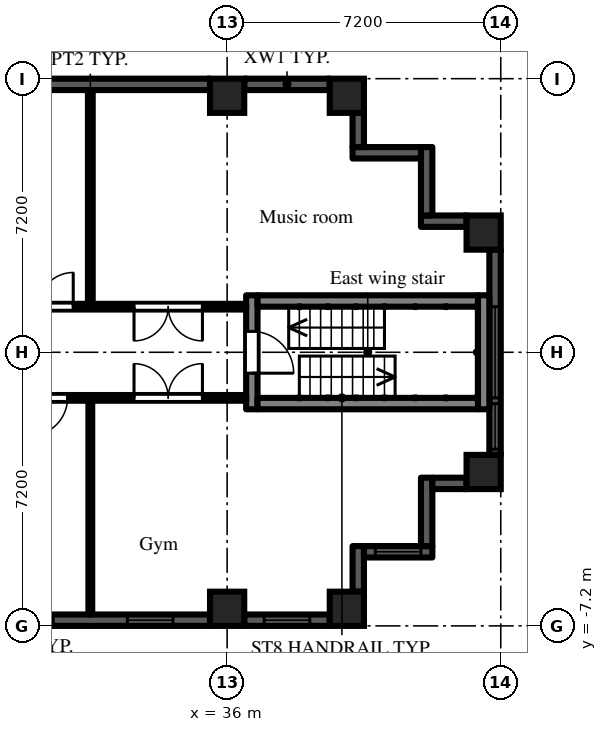
"""IFC4 building model, lengths in metres.
Left out: names, types, materials, properties, quantities, classifications, styles, units other than length and angle.
Written with IfcOpenShell. Run it as: python <this file> out.ifc"""

import sys

from ifc_helpers import new_model, si_unit, direction, frame, frame_2d, origin, origin_2d, place, context, subcontext, project, spatial, rectangle, extrude, element, fill, save


model = new_model("IFC4")
c1 = context("Model", 3, precision=1e-05, world=origin(), true_north=direction((0.0, 1.0)))
c2 = subcontext(c1, "Body", "Model", "MODEL_VIEW")
j1 = project(units=[si_unit("LENGTHUNIT", "METRE"), si_unit("PLANEANGLEUNIT", "RADIAN")], contexts=[c1])
p1 = place(None, origin())
s1 = spatial("IfcSite", under=j1, at=p1, CompositionType="ELEMENT")
p2 = place(p1, origin())
s2 = spatial("IfcBuilding", under=s1, at=p2, CompositionType="ELEMENT")
p3 = place(p2, frame((0.0, 0.0, 93.9)))
s3 = spatial("IfcBuildingStorey", under=s2, at=p3, CompositionType="ELEMENT", Elevation=93.9)
for number, where, z_axis, x_axis in (
    (1, (36.0, -6.75, 0.0), (0.0, 0.0, 1.0), (1.0, 0.0, 0.0)),
    (2, (36.0, 6.75, 0.0), (0.0, 0.0, 1.0), (1.0, 0.0, 0.0)),
    (3, (39.15, -6.75, 0.0), (0.0, 0.0, 1.0), (1.0, 0.0, 0.0)),
    (4, (39.15, 6.75, 0.0), (0.0, 0.0, 1.0), (1.0, 0.0, 0.0)),
    (5, (42.75, -3.15, 0.0), (0.0, 0.0, 1.0), (1.0, 0.0, 0.0)),
    (6, (42.75, 3.15, 0.0), (0.0, 0.0, 1.0), (1.0, 0.0, 0.0)),
):
    element("IfcColumn", number, at=place(p3, frame(where, z_axis=z_axis, x_axis=x_axis)), inside=s3, PredefinedType="COLUMN", context=c2, shape_type="SweptSolid", body=[
        extrude(rectangle(XDim=0.9, YDim=0.9, at=origin_2d()), origin(), (0.0, 0.0, 1.0), 3.0),
    ])
p4 = place(p3, frame((29.25, -7.05, 0.0), z_axis=(0.0, 0.0, 1.0), x_axis=(1.0, 0.0, 0.0)))
e7 = element("IfcWall", 7, at=p4, inside=s3, PredefinedType="SOLIDWALL", context=c2, shape_type="SweptSolid", body=[
    extrude(rectangle(XDim=6.3, YDim=0.3, at=frame_2d((3.15, 0.0))), origin(), (0.0, 0.0, 1.0), 2.1),
])
p5 = place(p4, frame((0.975, 0.0, 0.2)))
e8 = element("IfcOpeningElement", 8, at=p5, cuts=e7, PredefinedType="OPENING", context=c2, shape_type="SweptSolid", body=[
    extrude(rectangle(XDim=1.2, YDim=1.85, at=frame_2d((0.6, 0.925))), frame((0.0, 0.16, 0.0), z_axis=(0.0, -1.0, 0.0), x_axis=(1.0, 0.0, 0.0)), (0.0, 0.0, 1.0), 0.32),
])
p6 = place(p4, frame((4.125, 0.0, 0.2)))
e9 = element("IfcOpeningElement", 9, at=p6, cuts=e7, PredefinedType="OPENING", context=c2, shape_type="SweptSolid", body=[
    extrude(rectangle(XDim=1.2, YDim=1.85, at=frame_2d((0.6, 0.925))), frame((0.0, 0.16, 0.0), z_axis=(0.0, -1.0, 0.0), x_axis=(1.0, 0.0, 0.0)), (0.0, 0.0, 1.0), 0.32),
])
p7 = place(p3, frame((36.45, -7.05, 0.0), z_axis=(0.0, 0.0, 1.0), x_axis=(1.0, 0.0, 0.0)))
e10 = element("IfcWall", 10, at=p7, inside=s3, PredefinedType="SOLIDWALL", context=c2, shape_type="SweptSolid", body=[
    extrude(rectangle(XDim=2.25, YDim=0.3, at=frame_2d((1.125, 0.0))), origin(), (0.0, 0.0, 1.0), 2.1),
])
p8 = place(p7, frame((0.525, 0.0, 0.2)))
e11 = element("IfcOpeningElement", 11, at=p8, cuts=e10, PredefinedType="OPENING", context=c2, shape_type="SweptSolid", body=[
    extrude(rectangle(XDim=1.2, YDim=1.85, at=frame_2d((0.6, 0.925))), frame((0.0, 0.16, 0.0), z_axis=(0.0, -1.0, 0.0), x_axis=(1.0, 0.0, 0.0)), (0.0, 0.0, 1.0), 0.32),
])
p9 = place(p3, frame((39.45, -6.3, 0.0), z_axis=(0.0, 0.0, 1.0), x_axis=(0.0, 1.0, 0.0)))
e12 = element("IfcWall", 12, at=p9, inside=s3, PredefinedType="SOLIDWALL", context=c2, shape_type="SweptSolid", body=[
    extrude(rectangle(XDim=1.2, YDim=0.3, at=frame_2d((0.6, 0.0))), origin(), (0.0, 0.0, 1.0), 2.575),
])
p10 = place(p3, frame((39.6, -5.25, 0.0), z_axis=(0.0, 0.0, 1.0), x_axis=(1.0, 0.0, 0.0)))
e13 = element("IfcWall", 13, at=p10, inside=s3, PredefinedType="SOLIDWALL", context=c2, shape_type="SweptSolid", body=[
    extrude(rectangle(XDim=1.8, YDim=0.3, at=frame_2d((0.9, 0.0))), origin(), (0.0, 0.0, 1.0), 2.575),
])
p11 = place(p10, frame((0.3, 0.0, 0.2)))
e14 = element("IfcOpeningElement", 14, at=p11, cuts=e13, PredefinedType="OPENING", context=c2, shape_type="SweptSolid", body=[
    extrude(rectangle(XDim=1.2, YDim=1.85, at=frame_2d((0.6, 0.925))), frame((0.0, 0.16, 0.0), z_axis=(0.0, -1.0, 0.0), x_axis=(1.0, 0.0, 0.0)), (0.0, 0.0, 1.0), 0.32),
])
p12 = place(p3, frame((41.25, -5.1, 0.0), z_axis=(0.0, 0.0, 1.0), x_axis=(0.0, 1.0, 0.0)))
e15 = element("IfcWall", 15, at=p12, inside=s3, PredefinedType="SOLIDWALL", context=c2, shape_type="SweptSolid", body=[
    extrude(rectangle(XDim=1.8, YDim=0.3, at=frame_2d((0.9, 0.0))), origin(), (0.0, 0.0, 1.0), 2.575),
])
p13 = place(p3, frame((41.4, -3.45, 0.0), z_axis=(0.0, 0.0, 1.0), x_axis=(1.0, 0.0, 0.0)))
e16 = element("IfcWall", 16, at=p13, inside=s3, PredefinedType="SOLIDWALL", context=c2, shape_type="SweptSolid", body=[
    extrude(rectangle(XDim=0.9, YDim=0.3, at=frame_2d((0.45, 0.0))), origin(), (0.0, 0.0, 1.0), 2.575),
])
p14 = place(p3, frame((43.05, -2.7, 0.0), z_axis=(0.0, 0.0, 1.0), x_axis=(0.0, 1.0, 0.0)))
e17 = element("IfcWall", 17, at=p14, inside=s3, PredefinedType="SOLIDWALL", context=c2, shape_type="SweptSolid", body=[
    extrude(rectangle(XDim=5.4, YDim=0.3, at=frame_2d((2.7, 0.0))), origin(), (0.0, 0.0, 1.0), 2.1),
])
p15 = place(p14, frame((1.5, 0.0, 0.2)))
e18 = element("IfcOpeningElement", 18, at=p15, cuts=e17, PredefinedType="OPENING", context=c2, shape_type="SweptSolid", body=[
    extrude(rectangle(XDim=2.4, YDim=1.85, at=frame_2d((1.2, 0.925))), frame((0.0, 0.16, 0.0), z_axis=(0.0, -1.0, 0.0), x_axis=(1.0, 0.0, 0.0)), (0.0, 0.0, 1.0), 0.32),
])
p16 = place(p14, frame((0.15, 0.0, 0.2)))
e19 = element("IfcOpeningElement", 19, at=p16, cuts=e17, PredefinedType="OPENING", context=c2, shape_type="SweptSolid", body=[
    extrude(rectangle(XDim=1.2, YDim=1.85, at=frame_2d((0.6, 0.925))), frame((0.0, 0.16, 0.0), z_axis=(0.0, -1.0, 0.0), x_axis=(1.0, 0.0, 0.0)), (0.0, 0.0, 1.0), 0.32),
])
p17 = place(p3, frame((42.3, 3.45, 0.0), z_axis=(0.0, 0.0, 1.0), x_axis=(-1.0, 0.0, 0.0)))
e20 = element("IfcWall", 20, at=p17, inside=s3, PredefinedType="SOLIDWALL", context=c2, shape_type="SweptSolid", body=[
    extrude(rectangle(XDim=1.2, YDim=0.3, at=frame_2d((0.6, 0.0))), origin(), (0.0, 0.0, 1.0), 2.575),
])
p18 = place(p3, frame((41.25, 3.6, 0.0), z_axis=(0.0, 0.0, 1.0), x_axis=(0.0, 1.0, 0.0)))
e21 = element("IfcWall", 21, at=p18, inside=s3, PredefinedType="SOLIDWALL", context=c2, shape_type="SweptSolid", body=[
    extrude(rectangle(XDim=1.8, YDim=0.3, at=frame_2d((0.9, 0.0))), origin(), (0.0, 0.0, 1.0), 2.575),
])
p19 = place(p3, frame((41.1, 5.25, 0.0), z_axis=(0.0, 0.0, 1.0), x_axis=(-1.0, 0.0, 0.0)))
e22 = element("IfcWall", 22, at=p19, inside=s3, PredefinedType="SOLIDWALL", context=c2, shape_type="SweptSolid", body=[
    extrude(rectangle(XDim=1.8, YDim=0.3, at=frame_2d((0.9, 0.0))), origin(), (0.0, 0.0, 1.0), 2.575),
])
p20 = place(p3, frame((39.45, 5.4, 0.0), z_axis=(0.0, 0.0, 1.0), x_axis=(0.0, 1.0, 0.0)))
e23 = element("IfcWall", 23, at=p20, inside=s3, PredefinedType="SOLIDWALL", context=c2, shape_type="SweptSolid", body=[
    extrude(rectangle(XDim=0.9, YDim=0.3, at=frame_2d((0.45, 0.0))), origin(), (0.0, 0.0, 1.0), 2.575),
])
p21 = place(p3, frame((38.7, 7.05, 0.0), z_axis=(0.0, 0.0, 1.0), x_axis=(-1.0, 0.0, 0.0)))
e24 = element("IfcWall", 24, at=p21, inside=s3, PredefinedType="SOLIDWALL", context=c2, shape_type="SweptSolid", body=[
    extrude(rectangle(XDim=2.25, YDim=0.3, at=frame_2d((1.125, 0.0))), origin(), (0.0, 0.0, 1.0), 2.1),
])
p22 = place(p3, frame((35.55, 7.05, 0.0), z_axis=(0.0, 0.0, 1.0), x_axis=(-1.0, 0.0, 0.0)))
e25 = element("IfcWall", 25, at=p22, inside=s3, PredefinedType="SOLIDWALL", context=c2, shape_type="SweptSolid", body=[
    extrude(rectangle(XDim=6.3, YDim=0.3, at=frame_2d((3.15, 0.0))), origin(), (0.0, 0.0, 1.0), 2.1),
])
p23 = place(p3, frame((36.65, -1.5, 0.0), z_axis=(0.0, 0.0, 1.0), x_axis=(0.0, 1.0, 0.0)))
e26 = element("IfcWall", 26, at=p23, inside=s3, PredefinedType="SHEAR", context=c2, shape_type="SweptSolid", body=[
    extrude(rectangle(XDim=3.0, YDim=0.3, at=frame_2d((1.5, 0.0))), origin(), (0.0, 0.0, 1.0), 2.575),
])
p24 = place(p23, frame((0.95, 0.0, 0.0)))
e27 = element("IfcOpeningElement", 27, at=p24, cuts=e26, PredefinedType="OPENING", context=c2, shape_type="SweptSolid", body=[
    extrude(rectangle(XDim=1.1, YDim=2.1, at=frame_2d((0.55, 1.05))), frame((0.0, 0.16, 0.0), z_axis=(0.0, -1.0, 0.0), x_axis=(1.0, 0.0, 0.0)), (0.0, 0.0, 1.0), 0.32),
])
p25 = place(p3, frame((42.75, -1.5, 0.0), z_axis=(0.0, 0.0, 1.0), x_axis=(0.0, 1.0, 0.0)))
e28 = element("IfcWall", 28, at=p25, inside=s3, PredefinedType="SHEAR", context=c2, shape_type="SweptSolid", body=[
    extrude(rectangle(XDim=3.0, YDim=0.3, at=frame_2d((1.5, 0.0))), origin(), (0.0, 0.0, 1.0), 2.575),
])
for number, where, z_axis, x_axis in (
    (29, (36.8, -1.35, 0.0), (0.0, 0.0, 1.0), (1.0, 0.0, 0.0)),
    (30, (36.8, 1.35, 0.0), (0.0, 0.0, 1.0), (1.0, 0.0, 0.0)),
):
    element("IfcWall", number, at=place(p3, frame(where, z_axis=z_axis, x_axis=x_axis)), inside=s3, PredefinedType="SHEAR", context=c2, shape_type="SweptSolid", body=[
        extrude(rectangle(XDim=5.8, YDim=0.3, at=frame_2d((2.9, 0.0))), origin(), (0.0, 0.0, 1.0), 2.575),
    ])
p26 = place(p3, frame((21.6, -1.2, 0.0), z_axis=(0.0, 0.0, 1.0), x_axis=(1.0, 0.0, 0.0)))
e31 = element("IfcWall", 31, at=p26, inside=s3, PredefinedType="PARTITIONING", context=c2, shape_type="SweptSolid", body=[
    extrude(rectangle(XDim=14.9, YDim=0.15, at=frame_2d((7.45, 0.0))), origin(), (0.0, 0.0, 1.0), 2.575),
])
p27 = place(p26, frame((2.7, 0.0, 0.0)))
e32 = element("IfcOpeningElement", 32, at=p27, cuts=e31, PredefinedType="OPENING", context=c2, shape_type="SweptSolid", body=[
    extrude(rectangle(XDim=1.8, YDim=2.1, at=frame_2d((0.9, 1.05))), frame((0.0, 0.085, 0.0), z_axis=(0.0, -1.0, 0.0), x_axis=(1.0, 0.0, 0.0)), (0.0, 0.0, 1.0), 0.17),
])
p28 = place(p26, frame((9.2, 0.0, 0.0)))
e33 = element("IfcOpeningElement", 33, at=p28, cuts=e31, PredefinedType="OPENING", context=c2, shape_type="SweptSolid", body=[
    extrude(rectangle(XDim=1.0, YDim=2.1, at=frame_2d((0.5, 1.05))), frame((0.0, 0.085, 0.0), z_axis=(0.0, -1.0, 0.0), x_axis=(1.0, 0.0, 0.0)), (0.0, 0.0, 1.0), 0.17),
])
p29 = place(p26, frame((11.95, 0.0, 0.0)))
e34 = element("IfcOpeningElement", 34, at=p29, cuts=e31, PredefinedType="OPENING", context=c2, shape_type="SweptSolid", body=[
    extrude(rectangle(XDim=1.8, YDim=2.1, at=frame_2d((0.9, 1.05))), frame((0.0, 0.085, 0.0), z_axis=(0.0, -1.0, 0.0), x_axis=(1.0, 0.0, 0.0)), (0.0, 0.0, 1.0), 0.17),
])
p30 = place(p3, frame((21.6, 1.2, 0.0), z_axis=(0.0, 0.0, 1.0), x_axis=(1.0, 0.0, 0.0)))
e35 = element("IfcWall", 35, at=p30, inside=s3, PredefinedType="PARTITIONING", context=c2, shape_type="SweptSolid", body=[
    extrude(rectangle(XDim=14.9, YDim=0.15, at=frame_2d((7.45, 0.0))), origin(), (0.0, 0.0, 1.0), 2.575),
])
p31 = place(p30, frame((6.0, 0.0, 0.0)))
e36 = element("IfcOpeningElement", 36, at=p31, cuts=e35, PredefinedType="OPENING", context=c2, shape_type="SweptSolid", body=[
    extrude(rectangle(XDim=1.0, YDim=2.1, at=frame_2d((0.5, 1.05))), frame((0.0, 0.085, 0.0), z_axis=(0.0, -1.0, 0.0), x_axis=(1.0, 0.0, 0.0)), (0.0, 0.0, 1.0), 0.17),
])
p32 = place(p30, frame((7.65, 0.0, 0.0)))
e37 = element("IfcOpeningElement", 37, at=p32, cuts=e35, PredefinedType="OPENING", context=c2, shape_type="SweptSolid", body=[
    extrude(rectangle(XDim=0.9, YDim=2.1, at=frame_2d((0.45, 1.05))), frame((0.0, 0.085, 0.0), z_axis=(0.0, -1.0, 0.0), x_axis=(1.0, 0.0, 0.0)), (0.0, 0.0, 1.0), 0.17),
])
p33 = place(p30, frame((9.45, 0.0, 0.0)))
e38 = element("IfcOpeningElement", 38, at=p33, cuts=e35, PredefinedType="OPENING", context=c2, shape_type="SweptSolid", body=[
    extrude(rectangle(XDim=0.9, YDim=2.1, at=frame_2d((0.45, 1.05))), frame((0.0, 0.085, 0.0), z_axis=(0.0, -1.0, 0.0), x_axis=(1.0, 0.0, 0.0)), (0.0, 0.0, 1.0), 0.17),
])
p34 = place(p30, frame((11.95, 0.0, 0.0)))
e39 = element("IfcOpeningElement", 39, at=p34, cuts=e35, PredefinedType="OPENING", context=c2, shape_type="SweptSolid", body=[
    extrude(rectangle(XDim=1.8, YDim=2.1, at=frame_2d((0.9, 1.05))), frame((0.0, 0.085, 0.0), z_axis=(0.0, -1.0, 0.0), x_axis=(1.0, 0.0, 0.0)), (0.0, 0.0, 1.0), 0.17),
])
p35 = place(p3, frame((32.4, -6.9, 0.0), z_axis=(0.0, 0.0, 1.0), x_axis=(0.0, 1.0, 0.0)))
e40 = element("IfcWall", 40, at=p35, inside=s3, PredefinedType="PARTITIONING", context=c2, shape_type="SweptSolid", body=[
    extrude(rectangle(XDim=5.625, YDim=0.1, at=frame_2d((2.812, 0.0))), origin(), (0.0, 0.0, 1.0), 2.575),
])
p36 = place(p3, frame((32.4, 1.275, 0.0), z_axis=(0.0, 0.0, 1.0), x_axis=(0.0, 1.0, 0.0)))
e41 = element("IfcWall", 41, at=p36, inside=s3, PredefinedType="PARTITIONING", context=c2, shape_type="SweptSolid", body=[
    extrude(rectangle(XDim=5.625, YDim=0.125, at=frame_2d((2.812, 0.0))), origin(), (0.0, 0.0, 1.0), 2.575),
])
p37 = place(p5, origin())
e42 = element("IfcWindow", 42, at=p37, inside=s3, PartitioningType="SINGLE_PANEL", PredefinedType="WINDOW", context=c2, shape_type="SweptSolid", body=[
    extrude(rectangle(XDim=1.2, YDim=1.85, at=frame_2d((0.6, 0.925))), frame((0.0, 0.03, 0.0), z_axis=(0.0, -1.0, 0.0), x_axis=(1.0, 0.0, 0.0)), (0.0, 0.0, 1.0), 0.06),
])
fill(e8, e42)
p38 = place(p6, origin())
e43 = element("IfcWindow", 43, at=p38, inside=s3, PartitioningType="SINGLE_PANEL", PredefinedType="WINDOW", context=c2, shape_type="SweptSolid", body=[
    extrude(rectangle(XDim=1.2, YDim=1.85, at=frame_2d((0.6, 0.925))), frame((0.0, 0.03, 0.0), z_axis=(0.0, -1.0, 0.0), x_axis=(1.0, 0.0, 0.0)), (0.0, 0.0, 1.0), 0.06),
])
fill(e9, e43)
p39 = place(p8, origin())
e44 = element("IfcWindow", 44, at=p39, inside=s3, PartitioningType="SINGLE_PANEL", PredefinedType="WINDOW", context=c2, shape_type="SweptSolid", body=[
    extrude(rectangle(XDim=1.2, YDim=1.85, at=frame_2d((0.6, 0.925))), frame((0.0, 0.03, 0.0), z_axis=(0.0, -1.0, 0.0), x_axis=(1.0, 0.0, 0.0)), (0.0, 0.0, 1.0), 0.06),
])
fill(e11, e44)
p40 = place(p11, origin())
e45 = element("IfcWindow", 45, at=p40, inside=s3, PartitioningType="SINGLE_PANEL", PredefinedType="WINDOW", context=c2, shape_type="SweptSolid", body=[
    extrude(rectangle(XDim=1.2, YDim=1.85, at=frame_2d((0.6, 0.925))), frame((0.0, 0.03, 0.0), z_axis=(0.0, -1.0, 0.0), x_axis=(1.0, 0.0, 0.0)), (0.0, 0.0, 1.0), 0.06),
])
fill(e14, e45)
p41 = place(p15, origin())
e46 = element("IfcWindow", 46, at=p41, inside=s3, PartitioningType="SINGLE_PANEL", PredefinedType="WINDOW", context=c2, shape_type="SweptSolid", body=[
    extrude(rectangle(XDim=2.4, YDim=1.85, at=frame_2d((1.2, 0.925))), frame((0.0, 0.03, 0.0), z_axis=(0.0, -1.0, 0.0), x_axis=(1.0, 0.0, 0.0)), (0.0, 0.0, 1.0), 0.06),
])
fill(e18, e46)
p42 = place(p16, origin())
e47 = element("IfcWindow", 47, at=p42, inside=s3, PartitioningType="SINGLE_PANEL", PredefinedType="WINDOW", context=c2, shape_type="SweptSolid", body=[
    extrude(rectangle(XDim=1.2, YDim=1.85, at=frame_2d((0.6, 0.925))), frame((0.0, 0.03, 0.0), z_axis=(0.0, -1.0, 0.0), x_axis=(1.0, 0.0, 0.0)), (0.0, 0.0, 1.0), 0.06),
])
fill(e19, e47)
p43 = place(p24, frame((1.1, 0.0, 0.0), z_axis=(0.0, 0.0, 1.0), x_axis=(-1.0, 0.0, 0.0)))
e48 = element("IfcDoor", 48, at=p43, inside=s3, OperationType="SINGLE_SWING_RIGHT", PredefinedType="DOOR", context=c2, shape_type="SweptSolid", body=[
    extrude(rectangle(XDim=1.1, YDim=2.1, at=frame_2d((0.55, 1.05))), frame((0.0, 0.025, 0.0), z_axis=(0.0, -1.0, 0.0), x_axis=(1.0, 0.0, 0.0)), (0.0, 0.0, 1.0), 0.05),
])
fill(e27, e48)
p44 = place(p33, origin())
e49 = element("IfcDoor", 49, at=p44, inside=s3, OperationType="SINGLE_SWING_RIGHT", PredefinedType="DOOR", context=c2, shape_type="SweptSolid", body=[
    extrude(rectangle(XDim=0.9, YDim=2.1, at=frame_2d((0.45, 1.05))), frame((0.0, 0.025, 0.0), z_axis=(0.0, -1.0, 0.0), x_axis=(1.0, 0.0, 0.0)), (0.0, 0.0, 1.0), 0.05),
])
fill(e38, e49)
p45 = place(p34, frame((1.8, 0.0, 0.0), z_axis=(0.0, 0.0, 1.0), x_axis=(-1.0, 0.0, 0.0)))
e50 = element("IfcDoor", 50, at=p45, inside=s3, OperationType="DOUBLE_DOOR_DOUBLE_SWING", PredefinedType="DOOR", context=c2, shape_type="SweptSolid", body=[
    extrude(rectangle(XDim=1.8, YDim=2.1, at=frame_2d((0.9, 1.05))), frame((0.0, 0.025, 0.0), z_axis=(0.0, -1.0, 0.0), x_axis=(1.0, 0.0, 0.0)), (0.0, 0.0, 1.0), 0.05),
])
fill(e39, e50)
p46 = place(p28, frame((1.0, 0.0, 0.0), z_axis=(0.0, 0.0, 1.0), x_axis=(-1.0, 0.0, 0.0)))
e51 = element("IfcDoor", 51, at=p46, inside=s3, OperationType="SINGLE_SWING_RIGHT", PredefinedType="DOOR", context=c2, shape_type="SweptSolid", body=[
    extrude(rectangle(XDim=1.0, YDim=2.1, at=frame_2d((0.5, 1.05))), frame((0.0, 0.025, 0.0), z_axis=(0.0, -1.0, 0.0), x_axis=(1.0, 0.0, 0.0)), (0.0, 0.0, 1.0), 0.05),
])
fill(e33, e51)
p47 = place(p29, origin())
e52 = element("IfcDoor", 52, at=p47, inside=s3, OperationType="DOUBLE_DOOR_DOUBLE_SWING", PredefinedType="DOOR", context=c2, shape_type="SweptSolid", body=[
    extrude(rectangle(XDim=1.8, YDim=2.1, at=frame_2d((0.9, 1.05))), frame((0.0, 0.025, 0.0), z_axis=(0.0, -1.0, 0.0), x_axis=(1.0, 0.0, 0.0)), (0.0, 0.0, 1.0), 0.05),
])
fill(e34, e52)
save(model, sys.argv[1])
